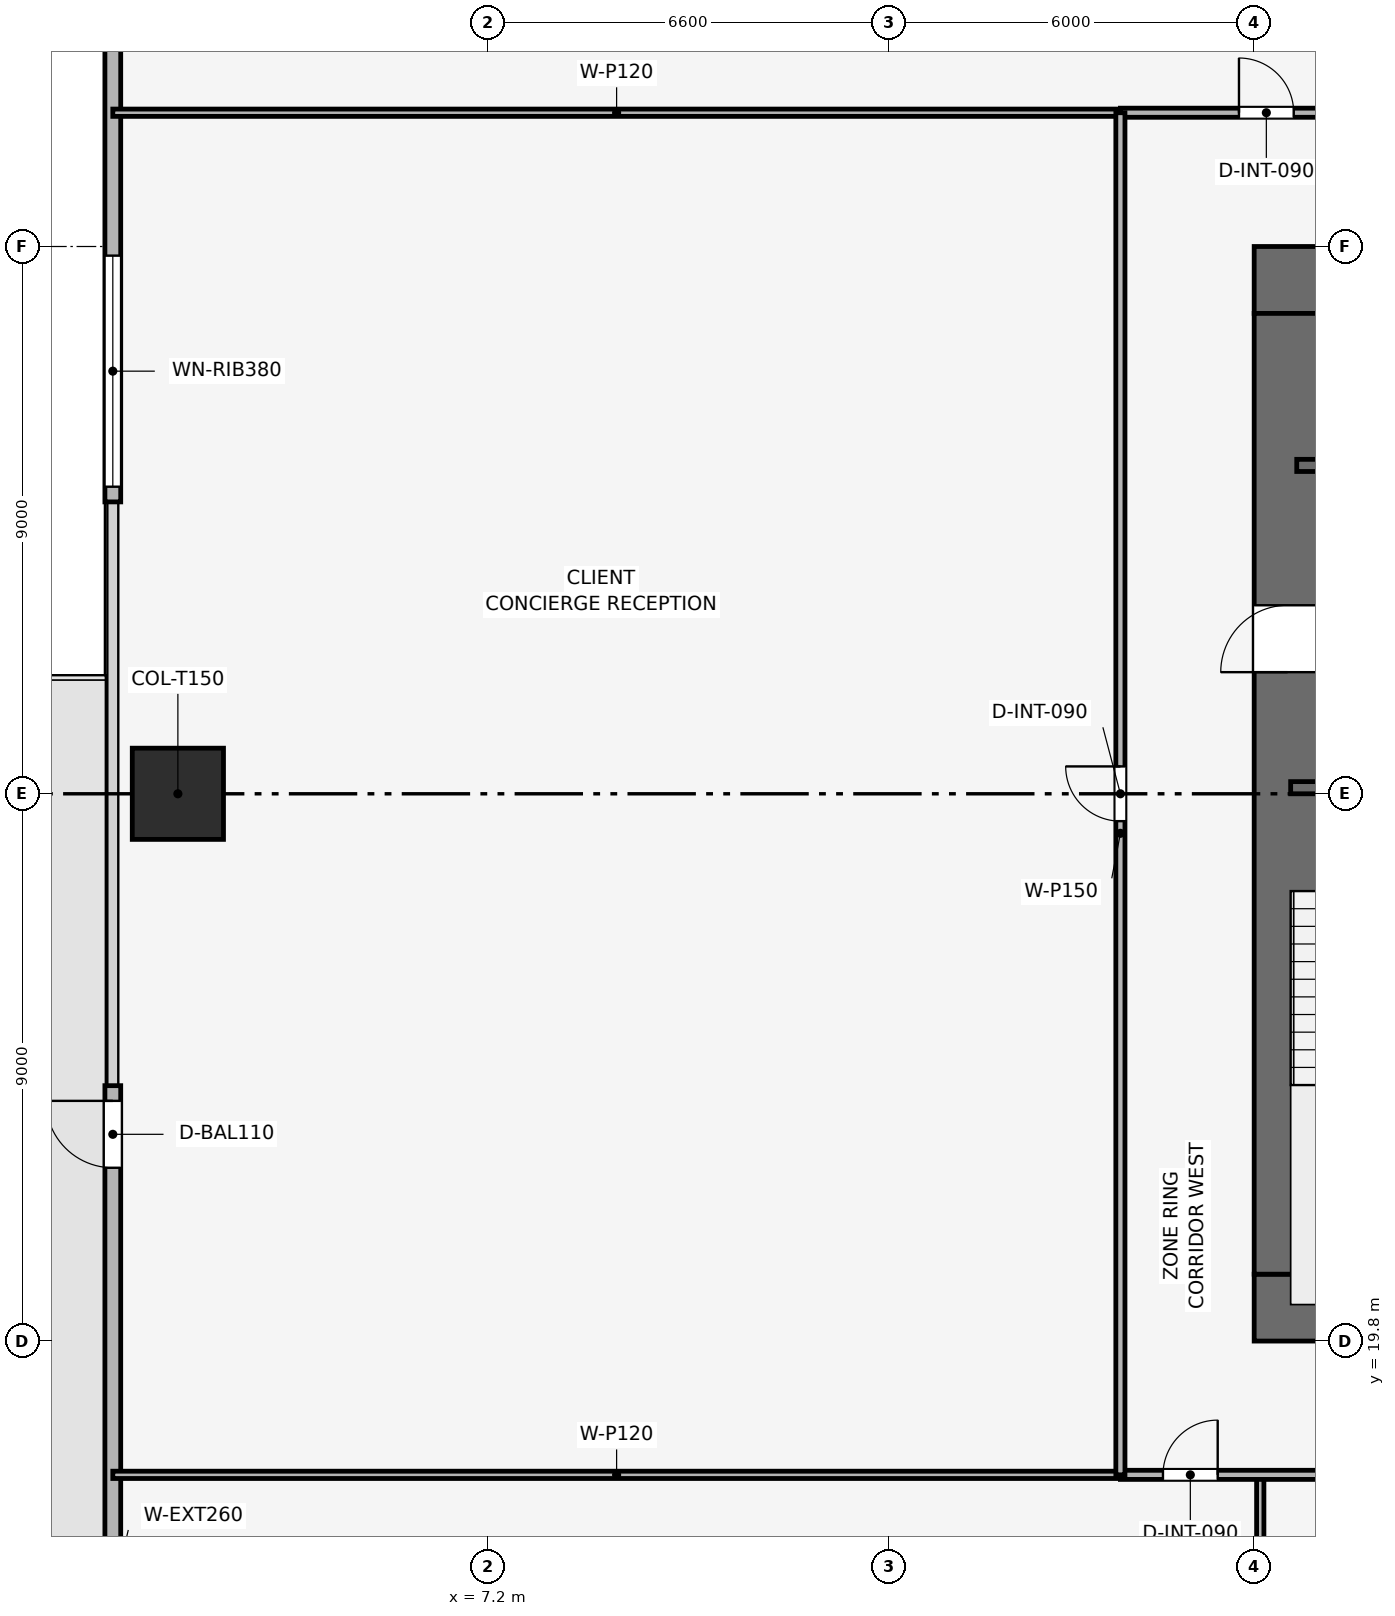
"""IFC4 building model, lengths in metres.
Left out: names, types, materials, properties, quantities, classifications, styles, units other than length and angle.
Written with IfcOpenShell. Run it as: python <this file> out.ifc"""

import sys

from ifc_helpers import new_model, si_unit, direction, frame, frame_2d, origin, origin_2d, place, context, subcontext, project, spatial, rectangle, extrude, element, fill, save


model = new_model("IFC4")
c1 = context("Model", 3, precision=1e-05, world=origin(), true_north=direction((0.0, 1.0)))
c2 = subcontext(c1, "Body", "Model", "MODEL_VIEW")
j1 = project(units=[si_unit("LENGTHUNIT", "METRE"), si_unit("PLANEANGLEUNIT", "RADIAN")], contexts=[c1])
p1 = place(None, origin())
s1 = spatial("IfcSite", under=j1, at=p1, CompositionType="ELEMENT")
p2 = place(p1, origin())
s2 = spatial("IfcBuilding", under=s1, at=p2, CompositionType="ELEMENT")
p3 = place(p2, frame((0.0, 0.0, 69.0)))
s3 = spatial("IfcBuildingStorey", under=s2, at=p3, CompositionType="ELEMENT", Elevation=69.0)
p4 = place(p3, frame((19.8, 20.35, 0.0), z_axis=(0.0, 0.0, 1.0), x_axis=(1.0, 0.0, 0.0)))
e1 = element("IfcWall", 1, at=p4, inside=s3, PredefinedType="SHEAR", context=c2, shape_type="SweptSolid", body=[
    extrude(rectangle(XDim=18.0, YDim=1.1, at=frame_2d((9.0, 0.0))), origin(), (0.0, 0.0, 1.0), 3.9),
])
p5 = place(p4, frame((8.4, 0.0, 0.0)))
e2 = element("IfcOpeningElement", 2, at=p5, cuts=e1, PredefinedType="OPENING", context=c2, shape_type="SweptSolid", body=[
    extrude(rectangle(XDim=1.2, YDim=2.2, at=frame_2d((0.6, 1.1))), frame((0.0, 0.56, 0.0), z_axis=(0.0, -1.0, 0.0), x_axis=(1.0, 0.0, 0.0)), (0.0, 0.0, 1.0), 1.12),
])
p6 = place(p3, frame((19.8, 37.25, 0.0), z_axis=(0.0, 0.0, 1.0), x_axis=(1.0, 0.0, 0.0)))
e3 = element("IfcWall", 3, at=p6, inside=s3, PredefinedType="SHEAR", context=c2, shape_type="SweptSolid", body=[
    extrude(rectangle(XDim=18.0, YDim=1.1, at=frame_2d((9.0, 0.0))), origin(), (0.0, 0.0, 1.0), 3.9),
])
p7 = place(p6, frame((7.05, 0.0, 0.0)))
e4 = element("IfcOpeningElement", 4, at=p7, cuts=e3, PredefinedType="OPENING", context=c2, shape_type="SweptSolid", body=[
    extrude(rectangle(XDim=1.1, YDim=2.15, at=frame_2d((0.55, 1.075))), frame((0.0, 0.56, 0.0), z_axis=(0.0, -1.0, 0.0), x_axis=(1.0, 0.0, 0.0)), (0.0, 0.0, 1.0), 1.12),
])
p8 = place(p3, frame((20.35, 20.9, 0.0), z_axis=(0.0, 0.0, 1.0), x_axis=(0.0, 1.0, 0.0)))
e5 = element("IfcWall", 5, at=p8, inside=s3, PredefinedType="SHEAR", context=c2, shape_type="SweptSolid", body=[
    extrude(rectangle(XDim=15.8, YDim=1.1, at=frame_2d((7.9, 0.0))), origin(), (0.0, 0.0, 1.0), 3.9),
])
p9 = place(p8, frame((9.9, 0.0, 0.0)))
e6 = element("IfcOpeningElement", 6, at=p9, cuts=e5, PredefinedType="OPENING", context=c2, shape_type="SweptSolid", body=[
    extrude(rectangle(XDim=1.1, YDim=2.15, at=frame_2d((0.55, 1.075))), frame((0.0, 0.56, 0.0), z_axis=(0.0, -1.0, 0.0), x_axis=(1.0, 0.0, 0.0)), (0.0, 0.0, 1.0), 1.12),
])
p10 = place(p3, frame((2.1, 28.8, 0.003), z_axis=(0.0, 0.0, 1.0), x_axis=(1.0, 0.0, 0.0)))
e7 = element("IfcColumn", 7, at=p10, inside=s3, PredefinedType="COLUMN", context=c2, shape_type="SweptSolid", body=[
    extrude(rectangle(XDim=1.5, YDim=1.5, at=origin_2d()), origin(), (0.0, 0.0, 1.0), 3.644),
])
p11 = place(p3, frame((1.03, 8.7, 0.0), z_axis=(0.0, 0.0, 1.0), x_axis=(0.0, 1.0, 0.0)))
e8 = element("IfcWall", 8, at=p11, inside=s3, PredefinedType="SOLIDWALL", context=c2, shape_type="SweptSolid", body=[
    extrude(rectangle(XDim=15.3, YDim=0.26, at=frame_2d((7.65, 0.0))), origin(), (0.0, 0.0, 1.0), 3.65),
])
p12 = place(p11, frame((13.95, 0.0, 0.0)))
e9 = element("IfcOpeningElement", 9, at=p12, cuts=e8, PredefinedType="OPENING", context=c2, shape_type="SweptSolid", body=[
    extrude(rectangle(XDim=1.1, YDim=2.2, at=frame_2d((0.55, 1.1))), frame((0.0, 0.14, 0.0), z_axis=(0.0, -1.0, 0.0), x_axis=(1.0, 0.0, 0.0)), (0.0, 0.0, 1.0), 0.28),
])
p13 = place(p3, frame((1.03, 33.6, 0.0), z_axis=(0.0, 0.0, 1.0), x_axis=(0.0, 1.0, 0.0)))
e10 = element("IfcWall", 10, at=p13, inside=s3, PredefinedType="SOLIDWALL", context=c2, shape_type="SweptSolid", body=[
    extrude(rectangle(XDim=15.3, YDim=0.26, at=frame_2d((7.65, 0.0))), origin(), (0.0, 0.0, 1.0), 3.65),
])
p14 = place(p13, frame((0.25, 0.0, 0.9)))
e11 = element("IfcOpeningElement", 11, at=p14, cuts=e10, PredefinedType="OPENING", context=c2, shape_type="SweptSolid", body=[
    extrude(rectangle(XDim=3.8, YDim=1.9, at=frame_2d((1.9, 0.95))), frame((0.0, 0.14, 0.0), z_axis=(0.0, -1.0, 0.0), x_axis=(1.0, 0.0, 0.0)), (0.0, 0.0, 1.0), 0.28),
])
p15 = place(p3, frame((20.4, 28.9, 0.0), z_axis=(0.0, 0.0, 1.0), x_axis=(1.0, 0.0, 0.0)))
e12 = element("IfcWall", 12, at=p15, inside=s3, PredefinedType="SHEAR", context=c2, shape_type="SweptSolid", body=[
    extrude(rectangle(XDim=3.15, YDim=0.2, at=frame_2d((1.575, 0.0))), origin(), (0.0, 0.0, 1.0), 3.65),
])
p16 = place(p15, frame((0.8, 0.0, 0.0)))
e13 = element("IfcOpeningElement", 13, at=p16, cuts=e12, PredefinedType="OPENING", context=c2, shape_type="SweptSolid", body=[
    extrude(rectangle(XDim=1.0, YDim=2.1, at=frame_2d((0.5, 1.05))), frame((0.0, 0.11, 0.0), z_axis=(0.0, -1.0, 0.0), x_axis=(1.0, 0.0, 0.0)), (0.0, 0.0, 1.0), 0.22),
])
p17 = place(p3, frame((20.5, 34.2, 0.0), z_axis=(0.0, 0.0, 1.0), x_axis=(1.0, 0.0, 0.0)))
e14 = element("IfcWall", 14, at=p17, inside=s3, PredefinedType="SHEAR", context=c2, shape_type="SweptSolid", body=[
    extrude(rectangle(XDim=3.05, YDim=0.2, at=frame_2d((1.525, 0.0))), origin(), (0.0, 0.0, 1.0), 3.65),
])
p18 = place(p17, frame((0.75, 0.0, 0.0)))
e15 = element("IfcOpeningElement", 15, at=p18, cuts=e14, PredefinedType="OPENING", context=c2, shape_type="SweptSolid", body=[
    extrude(rectangle(XDim=1.1, YDim=2.15, at=frame_2d((0.55, 1.075))), frame((0.0, 0.11, 0.0), z_axis=(0.0, -1.0, 0.0), x_axis=(1.0, 0.0, 0.0)), (0.0, 0.0, 1.0), 0.22),
])
for number, where, z_axis, x_axis in (
    (16, (19.9, 1.03, 0.0), (0.0, 0.0, 1.0), (0.0, 1.0, 0.0)),
    (17, (1.03, 17.6, 0.0), (0.0, 0.0, 1.0), (1.0, 0.0, 0.0)),
    (18, (1.03, 40.0, 0.0), (0.0, 0.0, 1.0), (1.0, 0.0, 0.0)),
):
    element("IfcWall", number, at=place(p3, frame(where, z_axis=z_axis, x_axis=x_axis)), inside=s3, PredefinedType="PARTITIONING", context=c2, shape_type="SweptSolid", body=[
        extrude(rectangle(XDim=16.57, YDim=0.12, at=frame_2d((8.285, 0.0))), origin(), (0.0, 0.0, 1.0), 2.935),
    ])
p19 = place(p3, frame((17.6, 17.6, 0.0), z_axis=(0.0, 0.0, 1.0), x_axis=(1.0, 0.0, 0.0)))
e19 = element("IfcWall", 19, at=p19, inside=s3, PredefinedType="PARTITIONING", context=c2, shape_type="SweptSolid", body=[
    extrude(rectangle(XDim=22.4, YDim=0.15, at=frame_2d((11.2, 0.0))), origin(), (0.0, 0.0, 1.0), 3.085),
])
p20 = place(p19, frame((0.7, 0.0, 0.0)))
e20 = element("IfcOpeningElement", 20, at=p20, cuts=e19, PredefinedType="OPENING", context=c2, shape_type="SweptSolid", body=[
    extrude(rectangle(XDim=0.9, YDim=2.1, at=frame_2d((0.45, 1.05))), frame((0.0, 0.085, 0.0), z_axis=(0.0, -1.0, 0.0), x_axis=(1.0, 0.0, 0.0)), (0.0, 0.0, 1.0), 0.17),
])
p21 = place(p19, frame((4.94, 0.0, 0.0)))
e21 = element("IfcOpeningElement", 21, at=p21, cuts=e19, PredefinedType="OPENING", context=c2, shape_type="SweptSolid", body=[
    extrude(rectangle(XDim=0.9, YDim=2.1, at=frame_2d((0.45, 1.05))), frame((0.0, 0.085, 0.0), z_axis=(0.0, -1.0, 0.0), x_axis=(1.0, 0.0, 0.0)), (0.0, 0.0, 1.0), 0.17),
])
p22 = place(p19, frame((10.912, 0.0, 0.0)))
e22 = element("IfcOpeningElement", 22, at=p22, cuts=e19, PredefinedType="OPENING", context=c2, shape_type="SweptSolid", body=[
    extrude(rectangle(XDim=0.9, YDim=2.1, at=frame_2d((0.45, 1.05))), frame((0.0, 0.085, 0.0), z_axis=(0.0, -1.0, 0.0), x_axis=(1.0, 0.0, 0.0)), (0.0, 0.0, 1.0), 0.17),
])
p23 = place(p19, frame((17.872, 0.0, 0.0)))
e23 = element("IfcOpeningElement", 23, at=p23, cuts=e19, PredefinedType="OPENING", context=c2, shape_type="SweptSolid", body=[
    extrude(rectangle(XDim=0.9, YDim=2.1, at=frame_2d((0.45, 1.05))), frame((0.0, 0.085, 0.0), z_axis=(0.0, -1.0, 0.0), x_axis=(1.0, 0.0, 0.0)), (0.0, 0.0, 1.0), 0.17),
])
p24 = place(p3, frame((17.6, 40.0, 0.0), z_axis=(0.0, 0.0, 1.0), x_axis=(1.0, 0.0, 0.0)))
e24 = element("IfcWall", 24, at=p24, inside=s3, PredefinedType="PARTITIONING", context=c2, shape_type="SweptSolid", body=[
    extrude(rectangle(XDim=22.4, YDim=0.15, at=frame_2d((11.2, 0.0))), origin(), (0.0, 0.0, 1.0), 3.085),
])
p25 = place(p24, frame((1.95, 0.0, 0.0)))
e25 = element("IfcOpeningElement", 25, at=p25, cuts=e24, PredefinedType="OPENING", context=c2, shape_type="SweptSolid", body=[
    extrude(rectangle(XDim=0.9, YDim=2.1, at=frame_2d((0.45, 1.05))), frame((0.0, 0.085, 0.0), z_axis=(0.0, -1.0, 0.0), x_axis=(1.0, 0.0, 0.0)), (0.0, 0.0, 1.0), 0.17),
])
p26 = place(p24, frame((5.75, 0.0, 0.0)))
e26 = element("IfcOpeningElement", 26, at=p26, cuts=e24, PredefinedType="OPENING", context=c2, shape_type="SweptSolid", body=[
    extrude(rectangle(XDim=0.9, YDim=2.1, at=frame_2d((0.45, 1.05))), frame((0.0, 0.085, 0.0), z_axis=(0.0, -1.0, 0.0), x_axis=(1.0, 0.0, 0.0)), (0.0, 0.0, 1.0), 0.17),
])
p27 = place(p24, frame((8.65, 0.0, 0.0)))
e27 = element("IfcOpeningElement", 27, at=p27, cuts=e24, PredefinedType="OPENING", context=c2, shape_type="SweptSolid", body=[
    extrude(rectangle(XDim=0.9, YDim=2.1, at=frame_2d((0.45, 1.05))), frame((0.0, 0.085, 0.0), z_axis=(0.0, -1.0, 0.0), x_axis=(1.0, 0.0, 0.0)), (0.0, 0.0, 1.0), 0.17),
])
p28 = place(p24, frame((11.4, 0.0, 0.0)))
e28 = element("IfcOpeningElement", 28, at=p28, cuts=e24, PredefinedType="OPENING", context=c2, shape_type="SweptSolid", body=[
    extrude(rectangle(XDim=0.95, YDim=2.1, at=frame_2d((0.475, 1.05))), frame((0.0, 0.085, 0.0), z_axis=(0.0, -1.0, 0.0), x_axis=(1.0, 0.0, 0.0)), (0.0, 0.0, 1.0), 0.17),
])
p29 = place(p24, frame((17.35, 0.0, 0.0)))
e29 = element("IfcOpeningElement", 29, at=p29, cuts=e24, PredefinedType="OPENING", context=c2, shape_type="SweptSolid", body=[
    extrude(rectangle(XDim=0.9, YDim=2.1, at=frame_2d((0.45, 1.05))), frame((0.0, 0.085, 0.0), z_axis=(0.0, -1.0, 0.0), x_axis=(1.0, 0.0, 0.0)), (0.0, 0.0, 1.0), 0.17),
])
p30 = place(p3, frame((17.6, 17.6, 0.0), z_axis=(0.0, 0.0, 1.0), x_axis=(0.0, 1.0, 0.0)))
e30 = element("IfcWall", 30, at=p30, inside=s3, PredefinedType="PARTITIONING", context=c2, shape_type="SweptSolid", body=[
    extrude(rectangle(XDim=22.4, YDim=0.15, at=frame_2d((11.2, 0.0))), origin(), (0.0, 0.0, 1.0), 3.085),
])
p31 = place(p30, frame((10.75, 0.0, 0.0)))
e31 = element("IfcOpeningElement", 31, at=p31, cuts=e30, PredefinedType="OPENING", context=c2, shape_type="SweptSolid", body=[
    extrude(rectangle(XDim=0.9, YDim=2.1, at=frame_2d((0.45, 1.05))), frame((0.0, 0.085, 0.0), z_axis=(0.0, -1.0, 0.0), x_axis=(1.0, 0.0, 0.0)), (0.0, 0.0, 1.0), 0.17),
])
p32 = place(p12, origin())
e32 = element("IfcDoor", 32, at=p32, inside=s3, OperationType="SINGLE_SWING_RIGHT", PredefinedType="DOOR", context=c2, shape_type="SweptSolid", body=[
    extrude(rectangle(XDim=1.1, YDim=2.2, at=frame_2d((0.55, 1.1))), frame((0.0, 0.025, 0.0), z_axis=(0.0, -1.0, 0.0), x_axis=(1.0, 0.0, 0.0)), (0.0, 0.0, 1.0), 0.05),
])
fill(e9, e32)
p33 = place(p14, origin())
e33 = element("IfcWindow", 33, at=p33, inside=s3, PartitioningType="SINGLE_PANEL", PredefinedType="WINDOW", context=c2, shape_type="SweptSolid", body=[
    extrude(rectangle(XDim=3.8, YDim=1.9, at=frame_2d((1.9, 0.95))), frame((0.0, 0.03, 0.0), z_axis=(0.0, -1.0, 0.0), x_axis=(1.0, 0.0, 0.0)), (0.0, 0.0, 1.0), 0.06),
])
fill(e11, e33)
p34 = place(p20, origin())
e34 = element("IfcDoor", 34, at=p34, inside=s3, OperationType="SINGLE_SWING_RIGHT", PredefinedType="DOOR", context=c2, shape_type="SweptSolid", body=[
    extrude(rectangle(XDim=0.9, YDim=2.1, at=frame_2d((0.45, 1.05))), frame((0.0, 0.025, 0.0), z_axis=(0.0, -1.0, 0.0), x_axis=(1.0, 0.0, 0.0)), (0.0, 0.0, 1.0), 0.05),
])
fill(e20, e34)
p35 = place(p25, origin())
e35 = element("IfcDoor", 35, at=p35, inside=s3, OperationType="SINGLE_SWING_LEFT", PredefinedType="DOOR", context=c2, shape_type="SweptSolid", body=[
    extrude(rectangle(XDim=0.9, YDim=2.1, at=frame_2d((0.45, 1.05))), frame((0.0, 0.025, 0.0), z_axis=(0.0, -1.0, 0.0), x_axis=(1.0, 0.0, 0.0)), (0.0, 0.0, 1.0), 0.05),
])
fill(e25, e35)
p36 = place(p31, origin())
e36 = element("IfcDoor", 36, at=p36, inside=s3, OperationType="SINGLE_SWING_RIGHT", PredefinedType="DOOR", context=c2, shape_type="SweptSolid", body=[
    extrude(rectangle(XDim=0.9, YDim=2.1, at=frame_2d((0.45, 1.05))), frame((0.0, 0.025, 0.0), z_axis=(0.0, -1.0, 0.0), x_axis=(1.0, 0.0, 0.0)), (0.0, 0.0, 1.0), 0.05),
])
fill(e31, e36)
p37 = place(p9, origin())
e37 = element("IfcDoor", 37, at=p37, inside=s3, OperationType="SINGLE_SWING_LEFT", PredefinedType="DOOR", context=c2, shape_type="SweptSolid", body=[
    extrude(rectangle(XDim=1.1, YDim=2.15, at=frame_2d((0.55, 1.075))), frame((0.0, 0.025, 0.0), z_axis=(0.0, -1.0, 0.0), x_axis=(1.0, 0.0, 0.0)), (0.0, 0.0, 1.0), 0.05),
])
fill(e6, e37)
save(model, sys.argv[1])
